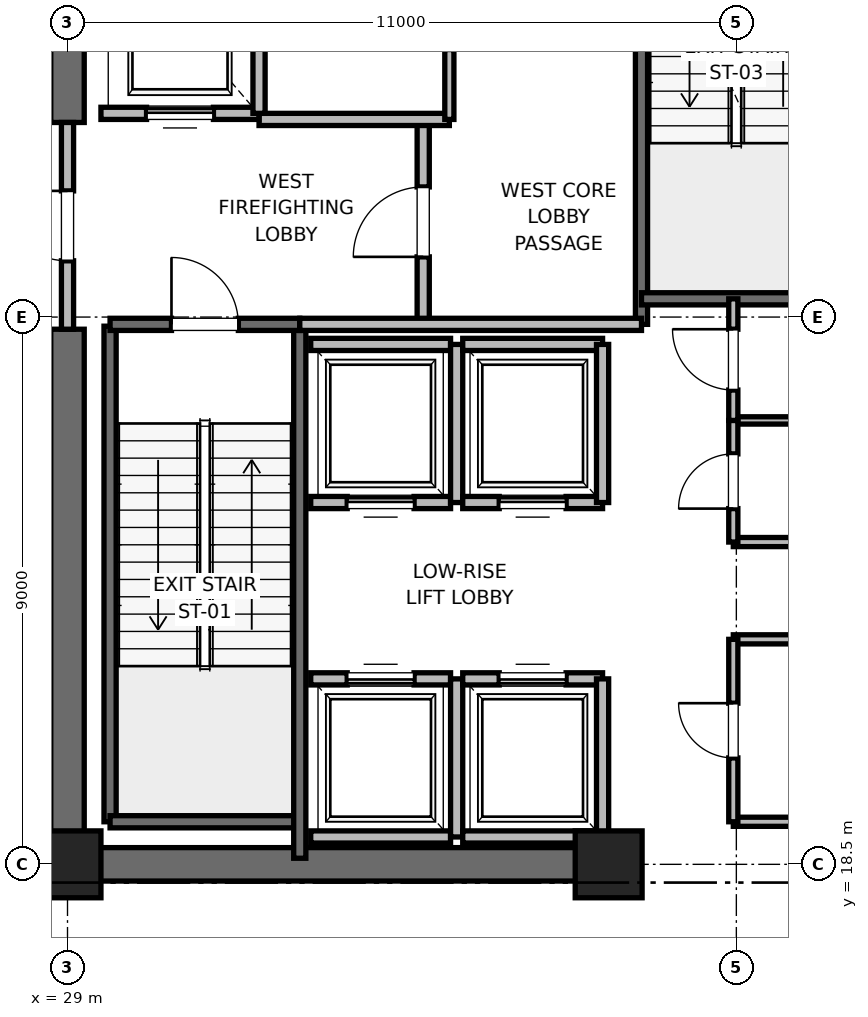
"""IFC4 building model, lengths in metres.
Left out: names, types, materials, properties, quantities, classifications, styles, units other than length and angle.
Written with IfcOpenShell. Run it as: python <this file> out.ifc"""

import sys

from ifc_helpers import new_model, si_unit, direction, frame, frame_2d, origin, origin_2d, place, context, subcontext, project, spatial, rectangle, extrude, element, fill, save


model = new_model("IFC4")
c1 = context("Model", 3, precision=1e-05, world=origin(), true_north=direction((0.0, 1.0)))
c2 = subcontext(c1, "Body", "Model", "MODEL_VIEW")
j1 = project(units=[si_unit("LENGTHUNIT", "METRE"), si_unit("PLANEANGLEUNIT", "RADIAN")], contexts=[c1])
p1 = place(None, origin())
s1 = spatial("IfcSite", under=j1, at=p1, CompositionType="ELEMENT")
p2 = place(p1, origin())
s2 = spatial("IfcBuilding", under=s1, at=p2, CompositionType="ELEMENT")
p3 = place(p2, frame((0.0, 0.0, 118.4)))
s3 = spatial("IfcBuildingStorey", under=s2, at=p3, CompositionType="ELEMENT", Elevation=118.4)
for number, where, z_axis, x_axis in (
    (1, (29.0, 18.5, 0.0), (0.0, 0.0, 1.0), (1.0, 0.0, 0.0)),
    (2, (37.9, 18.5, 0.0), (0.0, 0.0, 1.0), (1.0, 0.0, 0.0)),
):
    element("IfcColumn", number, at=place(p3, frame(where, z_axis=z_axis, x_axis=x_axis)), inside=s3, PredefinedType="PILASTER", context=c2, shape_type="SweptSolid", body=[
        extrude(rectangle(XDim=1.1, YDim=1.1, at=origin_2d()), origin(), (0.0, 0.0, 1.0), 5.0),
    ])
p4 = place(p3, frame((29.0, 18.5, 0.0), z_axis=(0.0, 0.0, 1.0), x_axis=(1.0, 0.0, 0.0)))
e3 = element("IfcWall", 3, at=p4, inside=s3, PredefinedType="SHEAR", context=c2, shape_type="SweptSolid", body=[
    extrude(rectangle(XDim=9.2, YDim=0.55, at=frame_2d((4.6, 0.0))), origin(), (0.0, 0.0, 1.0), 4.7),
])
p5 = place(p3, frame((29.0, 18.5, 0.0), z_axis=(0.0, 0.0, 1.0), x_axis=(0.0, 1.0, 0.0)))
e4 = element("IfcWall", 4, at=p5, inside=s3, PredefinedType="SHEAR", context=c2, shape_type="SweptSolid", body=[
    extrude(rectangle(XDim=8.8, YDim=0.55, at=frame_2d((4.4, 0.0))), origin(), (0.0, 0.0, 1.0), 4.7),
])
p6 = place(p3, frame((29.0, 30.7, 0.0), z_axis=(0.0, 0.0, 1.0), x_axis=(0.0, 1.0, 0.0)))
e5 = element("IfcWall", 5, at=p6, inside=s3, PredefinedType="SHEAR", context=c2, shape_type="SweptSolid", body=[
    extrude(rectangle(XDim=5.8, YDim=0.55, at=frame_2d((2.9, 0.0))), origin(), (0.0, 0.0, 1.0), 4.7),
])
p7 = place(p3, frame((29.7, 19.2, 0.0), z_axis=(0.0, 0.0, 1.0), x_axis=(0.0, 1.0, 0.0)))
e6 = element("IfcWall", 6, at=p7, inside=s3, PredefinedType="SOLIDWALL", context=c2, shape_type="SweptSolid", body=[
    extrude(rectangle(XDim=8.15, YDim=0.2, at=frame_2d((4.075, 0.0))), origin(), (0.0, 0.0, 1.0), 4.7),
])
p8 = place(p3, frame((29.7, 19.2, 0.0), z_axis=(0.0, 0.0, 1.0), x_axis=(1.0, 0.0, 0.0)))
e7 = element("IfcWall", 7, at=p8, inside=s3, PredefinedType="SOLIDWALL", context=c2, shape_type="SweptSolid", body=[
    extrude(rectangle(XDim=3.12, YDim=0.2, at=frame_2d((1.56, 0.0))), origin(), (0.0, 0.0, 1.0), 4.7),
])
p9 = place(p3, frame((32.82, 18.6, 0.0), z_axis=(0.0, 0.0, 1.0), x_axis=(0.0, 1.0, 0.0)))
e8 = element("IfcWall", 8, at=p9, inside=s3, PredefinedType="SOLIDWALL", context=c2, shape_type="SweptSolid", body=[
    extrude(rectangle(XDim=8.78, YDim=0.2, at=frame_2d((4.39, 0.0))), origin(), (0.0, 0.0, 1.0), 4.7),
])
p10 = place(p3, frame((29.7, 27.38, 0.0), z_axis=(0.0, 0.0, 1.0), x_axis=(1.0, 0.0, 0.0)))
e9 = element("IfcWall", 9, at=p10, inside=s3, PredefinedType="SOLIDWALL", context=c2, shape_type="SweptSolid", body=[
    extrude(rectangle(XDim=3.12, YDim=0.2, at=frame_2d((1.56, 0.0))), origin(), (0.0, 0.0, 1.0), 4.7),
])
p11 = place(p10, frame((1.01, 0.0, 0.0)))
e10 = element("IfcOpeningElement", 10, at=p11, cuts=e9, PredefinedType="OPENING", context=c2, shape_type="SweptSolid", body=[
    extrude(rectangle(XDim=1.1, YDim=2.15, at=frame_2d((0.55, 1.075))), frame((0.0, 0.1, 0.0), z_axis=(0.0, -1.0, 0.0), x_axis=(1.0, 0.0, 0.0)), (0.0, 0.0, 1.0), 0.2),
])
p12 = place(p3, frame((38.44, 27.38, 0.0), z_axis=(0.0, 0.0, 1.0), x_axis=(0.0, 1.0, 0.0)))
e11 = element("IfcWall", 11, at=p12, inside=s3, PredefinedType="SOLIDWALL", context=c2, shape_type="SweptSolid", body=[
    extrude(rectangle(XDim=8.87, YDim=0.2, at=frame_2d((4.435, 0.0))), origin(), (0.0, 0.0, 1.0), 4.7),
])
p13 = place(p3, frame((38.44, 27.8, 0.0), z_axis=(0.0, 0.0, 1.0), x_axis=(1.0, 0.0, 0.0)))
e12 = element("IfcWall", 12, at=p13, inside=s3, PredefinedType="SOLIDWALL", context=c2, shape_type="SweptSolid", body=[
    extrude(rectangle(XDim=3.32, YDim=0.2, at=frame_2d((1.66, 0.0))), origin(), (0.0, 0.0, 1.0), 4.7),
])
p14 = place(p3, frame((34.85, 27.38, 0.0), z_axis=(0.0, 0.0, 1.0), x_axis=(0.0, 1.0, 0.0)))
e13 = element("IfcWall", 13, at=p14, inside=s3, PredefinedType="PARTITIONING", context=c2, shape_type="SweptSolid", body=[
    extrude(rectangle(XDim=3.37, YDim=0.2, at=frame_2d((1.685, 0.0))), origin(), (0.0, 0.0, 1.0), 4.7),
])
p15 = place(p14, frame((1.11, 0.0, 0.0)))
e14 = element("IfcOpeningElement", 14, at=p15, cuts=e13, PredefinedType="OPENING", context=c2, shape_type="SweptSolid", body=[
    extrude(rectangle(XDim=1.15, YDim=2.2, at=frame_2d((0.575, 1.1))), frame((0.0, 0.1, 0.0), z_axis=(0.0, -1.0, 0.0), x_axis=(1.0, 0.0, 0.0)), (0.0, 0.0, 1.0), 0.2),
])
p16 = place(p3, frame((29.0, 27.3, 0.0), z_axis=(0.0, 0.0, 1.0), x_axis=(0.0, 1.0, 0.0)))
e15 = element("IfcWall", 15, at=p16, inside=s3, PredefinedType="PARTITIONING", context=c2, shape_type="SweptSolid", body=[
    extrude(rectangle(XDim=3.4, YDim=0.2, at=frame_2d((1.7, 0.0))), origin(), (0.0, 0.0, 1.0), 3.68),
])
p17 = place(p16, frame((1.125, 0.0, 0.0)))
e16 = element("IfcOpeningElement", 16, at=p17, cuts=e15, PredefinedType="OPENING", context=c2, shape_type="SweptSolid", body=[
    extrude(rectangle(XDim=1.15, YDim=2.2, at=frame_2d((0.575, 1.1))), frame((0.0, 0.1, 0.0), z_axis=(0.0, -1.0, 0.0), x_axis=(1.0, 0.0, 0.0)), (0.0, 0.0, 1.0), 0.2),
])
p18 = place(p3, frame((32.82, 27.38, 0.0), z_axis=(0.0, 0.0, 1.0), x_axis=(1.0, 0.0, 0.0)))
e17 = element("IfcWall", 17, at=p18, inside=s3, PredefinedType="PARTITIONING", context=c2, shape_type="SweptSolid", body=[
    extrude(rectangle(XDim=5.62, YDim=0.2, at=frame_2d((2.81, 0.0))), origin(), (0.0, 0.0, 1.0), 4.7),
])
p19 = place(p3, frame((32.15, 30.75, 0.0), z_axis=(0.0, 0.0, 1.0), x_axis=(1.0, 0.0, 0.0)))
e18 = element("IfcWall", 18, at=p19, inside=s3, PredefinedType="PARTITIONING", context=c2, shape_type="SweptSolid", body=[
    extrude(rectangle(XDim=3.13, YDim=0.2, at=frame_2d((1.565, 0.0))), origin(), (0.0, 0.0, 1.0), 4.7),
])
p20 = place(p3, frame((29.55, 30.85, 0.0), z_axis=(0.0, 0.0, 1.0), x_axis=(1.0, 0.0, 0.0)))
e19 = element("IfcWall", 19, at=p20, inside=s3, PredefinedType="SOLIDWALL", context=c2, shape_type="SweptSolid", body=[
    extrude(rectangle(XDim=2.6, YDim=0.2, at=frame_2d((1.3, 0.0))), origin(), (0.0, 0.0, 1.0), 3.68),
])
p21 = place(p20, frame((0.75, 0.0, 0.0)))
e20 = element("IfcOpeningElement", 20, at=p21, cuts=e19, PredefinedType="OPENING", context=c2, shape_type="SweptSolid", body=[
    extrude(rectangle(XDim=1.1, YDim=2.2, at=frame_2d((0.55, 1.1))), frame((0.0, 0.1, 0.0), z_axis=(0.0, -1.0, 0.0), x_axis=(1.0, 0.0, 0.0)), (0.0, 0.0, 1.0), 0.2),
])
p22 = place(p3, frame((32.15, 30.85, 0.0), z_axis=(0.0, 0.0, 1.0), x_axis=(0.0, 1.0, 0.0)))
e21 = element("IfcWall", 21, at=p22, inside=s3, PredefinedType="SOLIDWALL", context=c2, shape_type="SweptSolid", body=[
    extrude(rectangle(XDim=3.0, YDim=0.2, at=frame_2d((1.5, 0.0))), origin(), (0.0, 0.0, 1.0), 4.7),
])
p23 = place(p3, frame((33.0, 18.95, 0.0), z_axis=(0.0, 0.0, 1.0), x_axis=(1.0, 0.0, 0.0)))
e22 = element("IfcWall", 22, at=p23, inside=s3, PredefinedType="SOLIDWALL", context=c2, shape_type="SweptSolid", body=[
    extrude(rectangle(XDim=2.3, YDim=0.2, at=frame_2d((1.15, 0.0))), origin(), (0.0, 0.0, 1.0), 4.7),
])
p24 = place(p3, frame((35.3, 21.55, 0.0), z_axis=(0.0, 0.0, 1.0), x_axis=(-1.0, 0.0, 0.0)))
e23 = element("IfcWall", 23, at=p24, inside=s3, PredefinedType="SOLIDWALL", context=c2, shape_type="SweptSolid", body=[
    extrude(rectangle(XDim=2.3, YDim=0.2, at=frame_2d((1.15, 0.0))), origin(), (0.0, 0.0, 1.0), 4.7),
])
p25 = place(p24, frame((0.6, 0.0, 0.0)))
e24 = element("IfcOpeningElement", 24, at=p25, cuts=e23, PredefinedType="OPENING", context=c2, shape_type="SweptSolid", body=[
    extrude(rectangle(XDim=1.1, YDim=2.2, at=frame_2d((0.55, 1.1))), frame((0.0, 0.1, 0.0), z_axis=(0.0, -1.0, 0.0), x_axis=(1.0, 0.0, 0.0)), (0.0, 0.0, 1.0), 0.2),
])
p26 = place(p3, frame((35.4, 18.95, 0.0), z_axis=(0.0, 0.0, 1.0), x_axis=(0.0, 1.0, 0.0)))
e25 = element("IfcWall", 25, at=p26, inside=s3, PredefinedType="SOLIDWALL", context=c2, shape_type="SweptSolid", body=[
    extrude(rectangle(XDim=2.6, YDim=0.2, at=frame_2d((1.3, 0.0))), origin(), (0.0, 0.0, 1.0), 4.7),
])
p27 = place(p3, frame((35.5, 18.95, 0.0), z_axis=(0.0, 0.0, 1.0), x_axis=(1.0, 0.0, 0.0)))
e26 = element("IfcWall", 26, at=p27, inside=s3, PredefinedType="SOLIDWALL", context=c2, shape_type="SweptSolid", body=[
    extrude(rectangle(XDim=2.3, YDim=0.2, at=frame_2d((1.15, 0.0))), origin(), (0.0, 0.0, 1.0), 3.68),
])
p28 = place(p3, frame((37.8, 21.55, 0.0), z_axis=(0.0, 0.0, 1.0), x_axis=(-1.0, 0.0, 0.0)))
e27 = element("IfcWall", 27, at=p28, inside=s3, PredefinedType="SOLIDWALL", context=c2, shape_type="SweptSolid", body=[
    extrude(rectangle(XDim=2.3, YDim=0.2, at=frame_2d((1.15, 0.0))), origin(), (0.0, 0.0, 1.0), 4.7),
])
p29 = place(p28, frame((0.6, 0.0, 0.0)))
e28 = element("IfcOpeningElement", 28, at=p29, cuts=e27, PredefinedType="OPENING", context=c2, shape_type="SweptSolid", body=[
    extrude(rectangle(XDim=1.1, YDim=2.2, at=frame_2d((0.55, 1.1))), frame((0.0, 0.1, 0.0), z_axis=(0.0, -1.0, 0.0), x_axis=(1.0, 0.0, 0.0)), (0.0, 0.0, 1.0), 0.2),
])
p30 = place(p3, frame((37.8, 18.95, 0.0), z_axis=(0.0, 0.0, 1.0), x_axis=(0.0, 1.0, 0.0)))
e29 = element("IfcWall", 29, at=p30, inside=s3, PredefinedType="SOLIDWALL", context=c2, shape_type="SweptSolid", body=[
    extrude(rectangle(XDim=2.6, YDim=0.2, at=frame_2d((1.3, 0.0))), origin(), (0.0, 0.0, 1.0), 3.68),
])
p31 = place(p3, frame((33.0, 24.45, 0.0), z_axis=(0.0, 0.0, 1.0), x_axis=(1.0, 0.0, 0.0)))
e30 = element("IfcWall", 30, at=p31, inside=s3, PredefinedType="SOLIDWALL", context=c2, shape_type="SweptSolid", body=[
    extrude(rectangle(XDim=2.3, YDim=0.2, at=frame_2d((1.15, 0.0))), origin(), (0.0, 0.0, 1.0), 4.7),
])
p32 = place(p31, frame((0.6, 0.0, 0.0)))
e31 = element("IfcOpeningElement", 31, at=p32, cuts=e30, PredefinedType="OPENING", context=c2, shape_type="SweptSolid", body=[
    extrude(rectangle(XDim=1.1, YDim=2.2, at=frame_2d((0.55, 1.1))), frame((0.0, 0.1, 0.0), z_axis=(0.0, -1.0, 0.0), x_axis=(1.0, 0.0, 0.0)), (0.0, 0.0, 1.0), 0.2),
])
p33 = place(p3, frame((35.3, 27.05, 0.0), z_axis=(0.0, 0.0, 1.0), x_axis=(-1.0, 0.0, 0.0)))
e32 = element("IfcWall", 32, at=p33, inside=s3, PredefinedType="SOLIDWALL", context=c2, shape_type="SweptSolid", body=[
    extrude(rectangle(XDim=2.3, YDim=0.2, at=frame_2d((1.15, 0.0))), origin(), (0.0, 0.0, 1.0), 4.7),
])
p34 = place(p3, frame((35.4, 24.45, 0.0), z_axis=(0.0, 0.0, 1.0), x_axis=(0.0, 1.0, 0.0)))
e33 = element("IfcWall", 33, at=p34, inside=s3, PredefinedType="SOLIDWALL", context=c2, shape_type="SweptSolid", body=[
    extrude(rectangle(XDim=2.6, YDim=0.2, at=frame_2d((1.3, 0.0))), origin(), (0.0, 0.0, 1.0), 4.7),
])
p35 = place(p3, frame((35.5, 24.45, 0.0), z_axis=(0.0, 0.0, 1.0), x_axis=(1.0, 0.0, 0.0)))
e34 = element("IfcWall", 34, at=p35, inside=s3, PredefinedType="SOLIDWALL", context=c2, shape_type="SweptSolid", body=[
    extrude(rectangle(XDim=2.3, YDim=0.2, at=frame_2d((1.15, 0.0))), origin(), (0.0, 0.0, 1.0), 4.7),
])
p36 = place(p35, frame((0.6, 0.0, 0.0)))
e35 = element("IfcOpeningElement", 35, at=p36, cuts=e34, PredefinedType="OPENING", context=c2, shape_type="SweptSolid", body=[
    extrude(rectangle(XDim=1.1, YDim=2.2, at=frame_2d((0.55, 1.1))), frame((0.0, 0.1, 0.0), z_axis=(0.0, -1.0, 0.0), x_axis=(1.0, 0.0, 0.0)), (0.0, 0.0, 1.0), 0.2),
])
p37 = place(p3, frame((37.8, 27.05, 0.0), z_axis=(0.0, 0.0, 1.0), x_axis=(-1.0, 0.0, 0.0)))
e36 = element("IfcWall", 36, at=p37, inside=s3, PredefinedType="SOLIDWALL", context=c2, shape_type="SweptSolid", body=[
    extrude(rectangle(XDim=2.3, YDim=0.2, at=frame_2d((1.15, 0.0))), origin(), (0.0, 0.0, 1.0), 4.7),
])
p38 = place(p3, frame((37.8, 24.45, 0.0), z_axis=(0.0, 0.0, 1.0), x_axis=(0.0, 1.0, 0.0)))
e37 = element("IfcWall", 37, at=p38, inside=s3, PredefinedType="SOLIDWALL", context=c2, shape_type="SweptSolid", body=[
    extrude(rectangle(XDim=2.6, YDim=0.2, at=frame_2d((1.3, 0.0))), origin(), (0.0, 0.0, 1.0), 4.7),
])
for number, where, z_axis, x_axis in (
    (38, (39.95, 19.2, 0.0), (0.0, 0.0, 1.0), (1.0, 0.0, 0.0)),
    (39, (39.95, 22.2, 0.0), (0.0, 0.0, 1.0), (1.0, 0.0, 0.0)),
    (40, (39.95, 23.8, 0.0), (0.0, 0.0, 1.0), (1.0, 0.0, 0.0)),
):
    element("IfcWall", number, at=place(p3, frame(where, z_axis=z_axis, x_axis=x_axis)), inside=s3, PredefinedType="PARTITIONING", context=c2, shape_type="SweptSolid", body=[
        extrude(rectangle(XDim=1.81, YDim=0.15, at=frame_2d((0.905, 0.0))), origin(), (0.0, 0.0, 1.0), 2.85),
    ])
p39 = place(p3, frame((39.95, 25.8, 0.0), z_axis=(0.0, 0.0, 1.0), x_axis=(1.0, 0.0, 0.0)))
e41 = element("IfcWall", 41, at=p39, inside=s3, PredefinedType="PARTITIONING", context=c2, shape_type="SweptSolid", body=[
    extrude(rectangle(XDim=1.81, YDim=0.12, at=frame_2d((0.905, 0.0))), origin(), (0.0, 0.0, 1.0), 2.85),
])
p40 = place(p3, frame((39.95, 19.2, 0.0), z_axis=(0.0, 0.0, 1.0), x_axis=(0.0, 1.0, 0.0)))
e42 = element("IfcWall", 42, at=p40, inside=s3, PredefinedType="PARTITIONING", context=c2, shape_type="SweptSolid", body=[
    extrude(rectangle(XDim=3.0, YDim=0.15, at=frame_2d((1.5, 0.0))), origin(), (0.0, 0.0, 1.0), 2.85),
])
p41 = place(p40, frame((1.05, 0.0, 0.0)))
e43 = element("IfcOpeningElement", 43, at=p41, cuts=e42, PredefinedType="OPENING", context=c2, shape_type="SweptSolid", body=[
    extrude(rectangle(XDim=0.9, YDim=2.1, at=frame_2d((0.45, 1.05))), frame((0.0, 0.075, 0.0), z_axis=(0.0, -1.0, 0.0), x_axis=(1.0, 0.0, 0.0)), (0.0, 0.0, 1.0), 0.15),
])
p42 = place(p3, frame((39.95, 23.8, 0.0), z_axis=(0.0, 0.0, 1.0), x_axis=(0.0, 1.0, 0.0)))
e44 = element("IfcWall", 44, at=p42, inside=s3, PredefinedType="PARTITIONING", context=c2, shape_type="SweptSolid", body=[
    extrude(rectangle(XDim=2.0, YDim=0.15, at=frame_2d((1.0, 0.0))), origin(), (0.0, 0.0, 1.0), 2.85),
])
p43 = place(p42, frame((0.55, 0.0, 0.0)))
e45 = element("IfcOpeningElement", 45, at=p43, cuts=e44, PredefinedType="OPENING", context=c2, shape_type="SweptSolid", body=[
    extrude(rectangle(XDim=0.9, YDim=2.1, at=frame_2d((0.45, 1.05))), frame((0.0, 0.075, 0.0), z_axis=(0.0, -1.0, 0.0), x_axis=(1.0, 0.0, 0.0)), (0.0, 0.0, 1.0), 0.15),
])
p44 = place(p3, frame((39.95, 25.8, 0.0), z_axis=(0.0, 0.0, 1.0), x_axis=(0.0, 1.0, 0.0)))
e46 = element("IfcWall", 46, at=p44, inside=s3, PredefinedType="PARTITIONING", context=c2, shape_type="SweptSolid", body=[
    extrude(rectangle(XDim=2.0, YDim=0.15, at=frame_2d((1.0, 0.0))), origin(), (0.0, 0.0, 1.0), 2.85),
])
p45 = place(p44, frame((0.5, 0.0, 0.0)))
e47 = element("IfcOpeningElement", 47, at=p45, cuts=e46, PredefinedType="OPENING", context=c2, shape_type="SweptSolid", body=[
    extrude(rectangle(XDim=1.0, YDim=2.15, at=frame_2d((0.5, 1.075))), frame((0.0, 0.075, 0.0), z_axis=(0.0, -1.0, 0.0), x_axis=(1.0, 0.0, 0.0)), (0.0, 0.0, 1.0), 0.15),
])
p46 = place(p3, frame((35.28, 30.75, 0.0), z_axis=(0.0, 0.0, 1.0), x_axis=(0.0, 1.0, 0.0)))
e48 = element("IfcWall", 48, at=p46, inside=s3, PredefinedType="PARTITIONING", context=c2, shape_type="SweptSolid", body=[
    extrude(rectangle(XDim=3.2, YDim=0.15, at=frame_2d((1.6, 0.0))), origin(), (0.0, 0.0, 1.0), 2.85),
])
p47 = place(p46, frame((1.15, 0.0, 0.0)))
e49 = element("IfcOpeningElement", 49, at=p47, cuts=e48, PredefinedType="OPENING", context=c2, shape_type="SweptSolid", body=[
    extrude(rectangle(XDim=0.9, YDim=2.1, at=frame_2d((0.45, 1.05))), frame((0.0, 0.075, 0.0), z_axis=(0.0, -1.0, 0.0), x_axis=(1.0, 0.0, 0.0)), (0.0, 0.0, 1.0), 0.15),
])
p48 = place(p11, origin())
e50 = element("IfcDoor", 50, at=p48, inside=s3, OperationType="SINGLE_SWING_LEFT", PredefinedType="DOOR", context=c2, shape_type="SweptSolid", body=[
    extrude(rectangle(XDim=1.1, YDim=2.15, at=frame_2d((0.55, 1.075))), frame((0.0, 0.025, 0.0), z_axis=(0.0, -1.0, 0.0), x_axis=(1.0, 0.0, 0.0)), (0.0, 0.0, 1.0), 0.05),
])
fill(e10, e50)
p49 = place(p15, origin())
e51 = element("IfcDoor", 51, at=p49, inside=s3, OperationType="SINGLE_SWING_LEFT", PredefinedType="DOOR", context=c2, shape_type="SweptSolid", body=[
    extrude(rectangle(XDim=1.15, YDim=2.2, at=frame_2d((0.575, 1.1))), frame((0.0, 0.025, 0.0), z_axis=(0.0, -1.0, 0.0), x_axis=(1.0, 0.0, 0.0)), (0.0, 0.0, 1.0), 0.05),
])
fill(e14, e51)
p50 = place(p17, origin())
e52 = element("IfcDoor", 52, at=p50, inside=s3, OperationType="SINGLE_SWING_RIGHT", PredefinedType="DOOR", context=c2, shape_type="SweptSolid", body=[
    extrude(rectangle(XDim=1.15, YDim=2.2, at=frame_2d((0.575, 1.1))), frame((0.0, 0.025, 0.0), z_axis=(0.0, -1.0, 0.0), x_axis=(1.0, 0.0, 0.0)), (0.0, 0.0, 1.0), 0.05),
])
fill(e16, e52)
p51 = place(p21, origin())
e53 = element("IfcDoor", 53, at=p51, inside=s3, OperationType="SLIDING_TO_RIGHT", PredefinedType="DOOR", context=c2, shape_type="SweptSolid", body=[
    extrude(rectangle(XDim=1.1, YDim=2.2, at=frame_2d((0.55, 1.1))), frame((0.0, 0.025, 0.0), z_axis=(0.0, -1.0, 0.0), x_axis=(1.0, 0.0, 0.0)), (0.0, 0.0, 1.0), 0.05),
])
fill(e20, e53)
p52 = place(p25, origin())
e54 = element("IfcDoor", 54, at=p52, inside=s3, OperationType="SLIDING_TO_RIGHT", PredefinedType="DOOR", context=c2, shape_type="SweptSolid", body=[
    extrude(rectangle(XDim=1.1, YDim=2.2, at=frame_2d((0.55, 1.1))), frame((0.0, 0.025, 0.0), z_axis=(0.0, -1.0, 0.0), x_axis=(1.0, 0.0, 0.0)), (0.0, 0.0, 1.0), 0.05),
])
fill(e24, e54)
p53 = place(p29, origin())
e55 = element("IfcDoor", 55, at=p53, inside=s3, OperationType="SLIDING_TO_RIGHT", PredefinedType="DOOR", context=c2, shape_type="SweptSolid", body=[
    extrude(rectangle(XDim=1.1, YDim=2.2, at=frame_2d((0.55, 1.1))), frame((0.0, 0.025, 0.0), z_axis=(0.0, -1.0, 0.0), x_axis=(1.0, 0.0, 0.0)), (0.0, 0.0, 1.0), 0.05),
])
fill(e28, e55)
p54 = place(p32, origin())
e56 = element("IfcDoor", 56, at=p54, inside=s3, OperationType="SLIDING_TO_RIGHT", PredefinedType="DOOR", context=c2, shape_type="SweptSolid", body=[
    extrude(rectangle(XDim=1.1, YDim=2.2, at=frame_2d((0.55, 1.1))), frame((0.0, 0.025, 0.0), z_axis=(0.0, -1.0, 0.0), x_axis=(1.0, 0.0, 0.0)), (0.0, 0.0, 1.0), 0.05),
])
fill(e31, e56)
p55 = place(p36, origin())
e57 = element("IfcDoor", 57, at=p55, inside=s3, OperationType="SLIDING_TO_RIGHT", PredefinedType="DOOR", context=c2, shape_type="SweptSolid", body=[
    extrude(rectangle(XDim=1.1, YDim=2.2, at=frame_2d((0.55, 1.1))), frame((0.0, 0.025, 0.0), z_axis=(0.0, -1.0, 0.0), x_axis=(1.0, 0.0, 0.0)), (0.0, 0.0, 1.0), 0.05),
])
fill(e35, e57)
p56 = place(p41, origin())
e58 = element("IfcDoor", 58, at=p56, inside=s3, OperationType="SINGLE_SWING_RIGHT", PredefinedType="DOOR", context=c2, shape_type="SweptSolid", body=[
    extrude(rectangle(XDim=0.9, YDim=2.1, at=frame_2d((0.45, 1.05))), frame((0.0, 0.025, 0.0), z_axis=(0.0, -1.0, 0.0), x_axis=(1.0, 0.0, 0.0)), (0.0, 0.0, 1.0), 0.05),
])
fill(e43, e58)
p57 = place(p43, origin())
e59 = element("IfcDoor", 59, at=p57, inside=s3, OperationType="SINGLE_SWING_LEFT", PredefinedType="DOOR", context=c2, shape_type="SweptSolid", body=[
    extrude(rectangle(XDim=0.9, YDim=2.1, at=frame_2d((0.45, 1.05))), frame((0.0, 0.025, 0.0), z_axis=(0.0, -1.0, 0.0), x_axis=(1.0, 0.0, 0.0)), (0.0, 0.0, 1.0), 0.05),
])
fill(e45, e59)
p58 = place(p45, origin())
e60 = element("IfcDoor", 60, at=p58, inside=s3, OperationType="SINGLE_SWING_RIGHT", PredefinedType="DOOR", context=c2, shape_type="SweptSolid", body=[
    extrude(rectangle(XDim=1.0, YDim=2.15, at=frame_2d((0.5, 1.075))), frame((0.0, 0.025, 0.0), z_axis=(0.0, -1.0, 0.0), x_axis=(1.0, 0.0, 0.0)), (0.0, 0.0, 1.0), 0.05),
])
fill(e47, e60)
save(model, sys.argv[1])
